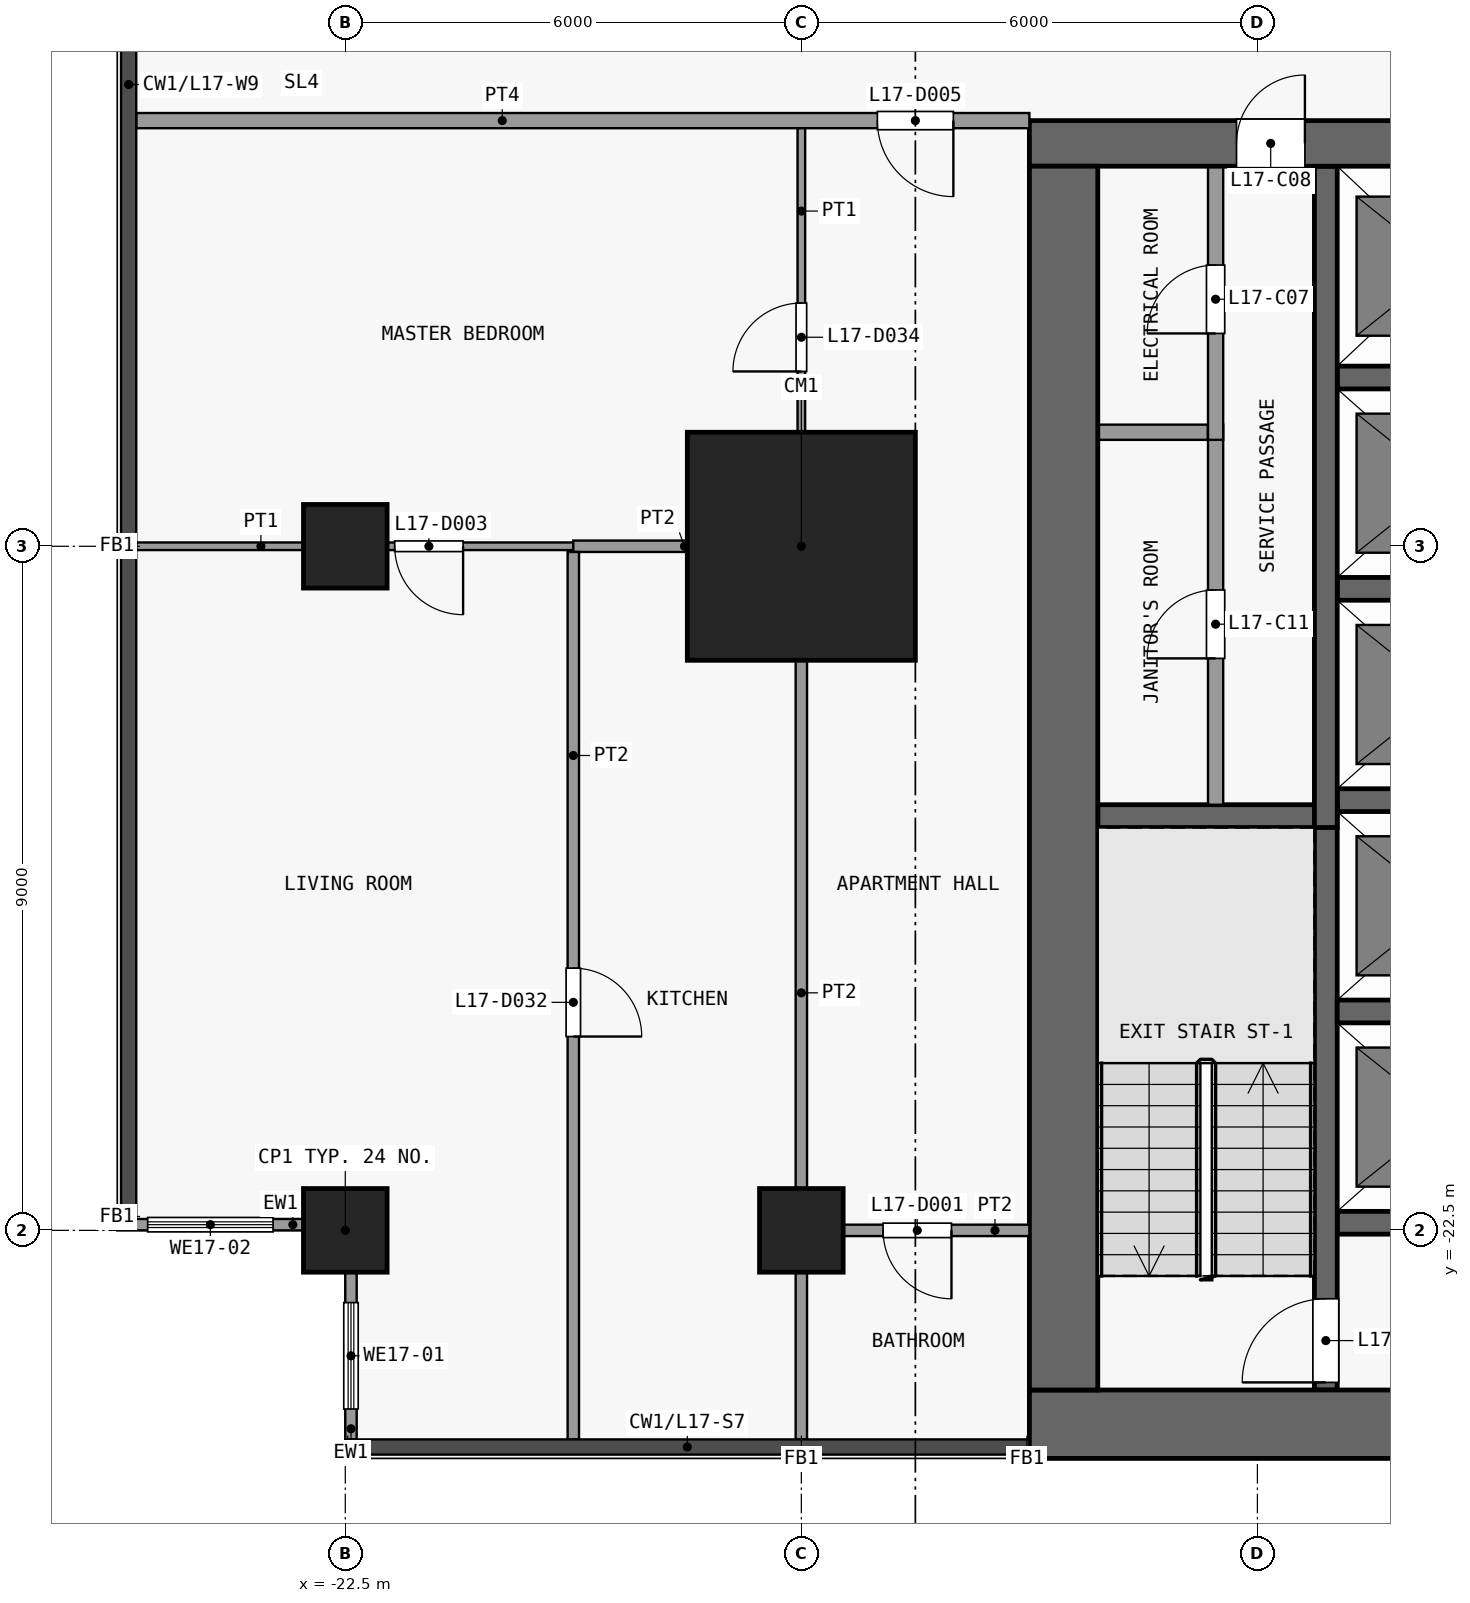
"""IFC4 building model, lengths in metres.
Left out: names, types, materials, properties, quantities, classifications, styles, units other than length and angle.
Written with IfcOpenShell. Run it as: python <this file> out.ifc"""

import sys

from ifc_helpers import new_model, si_unit, direction, frame, frame_2d, origin, origin_2d, place, context, subcontext, project, spatial, rectangle, extrude, element, fill, save


model = new_model("IFC4")
c1 = context("Model", 3, precision=1e-05, world=origin(), true_north=direction((0.0, 1.0)))
c2 = subcontext(c1, "Body", "Model", "MODEL_VIEW")
j1 = project(units=[si_unit("LENGTHUNIT", "METRE"), si_unit("PLANEANGLEUNIT", "RADIAN")], contexts=[c1])
p1 = place(None, origin())
s1 = spatial("IfcSite", under=j1, at=p1, CompositionType="ELEMENT")
p2 = place(p1, origin())
s2 = spatial("IfcBuilding", under=s1, at=p2, CompositionType="ELEMENT")
p3 = place(p2, frame((0.0, 0.0, 72.1)))
s3 = spatial("IfcBuildingStorey", under=s2, at=p3, CompositionType="ELEMENT", Elevation=72.1)
for number, where, z_axis, x_axis in (
    (1, (-22.5, -22.5, 0.0), (0.0, 0.0, 1.0), (1.0, 0.0, 0.0)),
    (2, (-22.5, -13.5, 0.0), (0.0, 0.0, 1.0), (1.0, 0.0, 0.0)),
    (3, (-16.5, -22.5, 0.0), (0.0, 0.0, 1.0), (1.0, 0.0, 0.0)),
):
    element("IfcColumn", number, at=place(p3, frame(where, z_axis=z_axis, x_axis=x_axis)), inside=s3, PredefinedType="COLUMN", context=c2, shape_type="SweptSolid", body=[
        extrude(rectangle(XDim=1.1, YDim=1.1, at=origin_2d()), origin(), (0.0, 0.0, 1.0), 3.6),
    ])
p4 = place(p3, frame((-16.5, -13.5, 0.0), z_axis=(0.0, 0.0, 1.0), x_axis=(1.0, 0.0, 0.0)))
e4 = element("IfcColumn", 4, at=p4, inside=s3, PredefinedType="COLUMN", context=c2, shape_type="SweptSolid", body=[
    extrude(rectangle(XDim=3.0, YDim=3.0, at=origin_2d()), origin(), (0.0, 0.0, 1.0), 3.6),
])
p5 = place(p3, frame((-13.5, -25.05, 0.0), z_axis=(0.0, 0.0, 1.0), x_axis=(1.0, 0.0, 0.0)))
e5 = element("IfcWall", 5, at=p5, inside=s3, PredefinedType="SHEAR", context=c2, shape_type="SweptSolid", body=[
    extrude(rectangle(XDim=27.0, YDim=0.9, at=frame_2d((13.5, 0.0))), origin(), (0.0, 0.0, 1.0), 3.15),
])
p6 = place(p3, frame((-13.5, -8.2, 0.0), z_axis=(0.0, 0.0, 1.0), x_axis=(1.0, 0.0, 0.0)))
e6 = element("IfcWall", 6, at=p6, inside=s3, PredefinedType="SHEAR", context=c2, shape_type="SweptSolid", body=[
    extrude(rectangle(XDim=27.0, YDim=0.6, at=frame_2d((13.5, 0.0))), origin(), (0.0, 0.0, 1.0), 3.15),
])
p7 = place(p6, frame((7.8, 0.0, 0.0)))
e7 = element("IfcOpeningElement", 7, at=p7, cuts=e6, PredefinedType="OPENING", context=c2, shape_type="SweptSolid", body=[
    extrude(rectangle(XDim=1.8, YDim=2.1, at=frame_2d((0.9, 1.05))), frame((0.0, 0.31, 0.0), z_axis=(0.0, -1.0, 0.0), x_axis=(1.0, 0.0, 0.0)), (0.0, 0.0, 1.0), 0.62),
])
p8 = place(p6, frame((17.4, 0.0, 0.0)))
e8 = element("IfcOpeningElement", 8, at=p8, cuts=e6, PredefinedType="OPENING", context=c2, shape_type="SweptSolid", body=[
    extrude(rectangle(XDim=1.8, YDim=2.1, at=frame_2d((0.9, 1.05))), frame((0.0, 0.31, 0.0), z_axis=(0.0, -1.0, 0.0), x_axis=(1.0, 0.0, 0.0)), (0.0, 0.0, 1.0), 0.62),
])
p9 = place(p6, frame((2.725, 0.0, 0.0)))
e9 = element("IfcOpeningElement", 9, at=p9, cuts=e6, PredefinedType="OPENING", context=c2, shape_type="SweptSolid", body=[
    extrude(rectangle(XDim=0.9, YDim=2.1, at=frame_2d((0.45, 1.05))), frame((0.0, 0.31, 0.0), z_axis=(0.0, -1.0, 0.0), x_axis=(1.0, 0.0, 0.0)), (0.0, 0.0, 1.0), 0.62),
])
p10 = place(p6, frame((24.075, 0.0, 0.0)))
e10 = element("IfcOpeningElement", 10, at=p10, cuts=e6, PredefinedType="OPENING", context=c2, shape_type="SweptSolid", body=[
    extrude(rectangle(XDim=1.2, YDim=2.1, at=frame_2d((0.6, 1.05))), frame((0.0, 0.31, 0.0), z_axis=(0.0, -1.0, 0.0), x_axis=(1.0, 0.0, 0.0)), (0.0, 0.0, 1.0), 0.62),
])
p11 = place(p3, frame((-13.05, -24.6, 0.0), z_axis=(0.0, 0.0, 1.0), x_axis=(0.0, 1.0, 0.0)))
e11 = element("IfcWall", 11, at=p11, inside=s3, PredefinedType="SHEAR", context=c2, shape_type="SweptSolid", body=[
    extrude(rectangle(XDim=16.1, YDim=0.9, at=frame_2d((8.05, 0.0))), origin(), (0.0, 0.0, 1.0), 3.15),
])
for number, where, z_axis, x_axis in (
    (12, (-9.45, -22.4, 0.0), (0.0, 0.0, 1.0), (1.0, 0.0, 0.0)),
    (13, (-9.45, -19.62, 0.0), (0.0, 0.0, 1.0), (1.0, 0.0, 0.0)),
):
    element("IfcWall", number, at=place(p3, frame(where, z_axis=z_axis, x_axis=x_axis)), inside=s3, PredefinedType="SHEAR", context=c2, shape_type="SweptSolid", body=[
        extrude(rectangle(XDim=2.8, YDim=0.3, at=frame_2d((1.4, 0.0))), origin(), (0.0, 0.0, 1.0), 3.15),
    ])
p12 = place(p3, frame((-12.6, -17.05, 0.0), z_axis=(0.0, 0.0, 1.0), x_axis=(1.0, 0.0, 0.0)))
e14 = element("IfcWall", 14, at=p12, inside=s3, PredefinedType="SHEAR", context=c2, shape_type="SweptSolid", body=[
    extrude(rectangle(XDim=2.85, YDim=0.3, at=frame_2d((1.425, 0.0))), origin(), (0.0, 0.0, 1.0), 3.15),
])
for number, where, z_axis, x_axis in (
    (15, (-9.45, -16.84, 0.0), (0.0, 0.0, 1.0), (1.0, 0.0, 0.0)),
    (16, (-9.45, -14.06, 0.0), (0.0, 0.0, 1.0), (1.0, 0.0, 0.0)),
):
    element("IfcWall", number, at=place(p3, frame(where, z_axis=z_axis, x_axis=x_axis)), inside=s3, PredefinedType="SHEAR", context=c2, shape_type="SweptSolid", body=[
        extrude(rectangle(XDim=2.8, YDim=0.3, at=frame_2d((1.4, 0.0))), origin(), (0.0, 0.0, 1.0), 3.15),
    ])
p13 = place(p3, frame((-12.6, -12.0, 0.0), z_axis=(0.0, 0.0, 1.0), x_axis=(1.0, 0.0, 0.0)))
e17 = element("IfcWall", 17, at=p13, inside=s3, PredefinedType="PARTITIONING", context=c2, shape_type="SweptSolid", body=[
    extrude(rectangle(XDim=1.45, YDim=0.2, at=frame_2d((0.725, 0.0))), origin(), (0.0, 0.0, 1.0), 3.15),
])
p14 = place(p3, frame((-9.45, -11.28, 0.0), z_axis=(0.0, 0.0, 1.0), x_axis=(1.0, 0.0, 0.0)))
e18 = element("IfcWall", 18, at=p14, inside=s3, PredefinedType="SHEAR", context=c2, shape_type="SweptSolid", body=[
    extrude(rectangle(XDim=2.8, YDim=0.3, at=frame_2d((1.4, 0.0))), origin(), (0.0, 0.0, 1.0), 3.15),
])
p15 = place(p3, frame((-11.05, -16.9, 0.0), z_axis=(0.0, 0.0, 1.0), x_axis=(0.0, 1.0, 0.0)))
e19 = element("IfcWall", 19, at=p15, inside=s3, PredefinedType="PARTITIONING", context=c2, shape_type="SweptSolid", body=[
    extrude(rectangle(XDim=5.0, YDim=0.2, at=frame_2d((2.5, 0.0))), origin(), (0.0, 0.0, 1.0), 3.15),
])
p16 = place(p15, frame((1.925, 0.0, 0.0)))
e20 = element("IfcOpeningElement", 20, at=p16, cuts=e19, PredefinedType="OPENING", context=c2, shape_type="SweptSolid", body=[
    extrude(rectangle(XDim=0.9, YDim=2.1, at=frame_2d((0.45, 1.05))), frame((0.0, 0.11, 0.0), z_axis=(0.0, -1.0, 0.0), x_axis=(1.0, 0.0, 0.0)), (0.0, 0.0, 1.0), 0.22),
])
p17 = place(p3, frame((-11.05, -12.1, 0.0), z_axis=(0.0, 0.0, 1.0), x_axis=(0.0, 1.0, 0.0)))
e21 = element("IfcWall", 21, at=p17, inside=s3, PredefinedType="PARTITIONING", context=c2, shape_type="SweptSolid", body=[
    extrude(rectangle(XDim=3.6, YDim=0.2, at=frame_2d((1.8, 0.0))), origin(), (0.0, 0.0, 1.0), 3.15),
])
p18 = place(p17, frame((1.4, 0.0, 0.0)))
e22 = element("IfcOpeningElement", 22, at=p18, cuts=e21, PredefinedType="OPENING", context=c2, shape_type="SweptSolid", body=[
    extrude(rectangle(XDim=0.9, YDim=2.1, at=frame_2d((0.45, 1.05))), frame((0.0, 0.11, 0.0), z_axis=(0.0, -1.0, 0.0), x_axis=(1.0, 0.0, 0.0)), (0.0, 0.0, 1.0), 0.22),
])
p19 = place(p3, frame((-9.6, -24.6, 0.0), z_axis=(0.0, 0.0, 1.0), x_axis=(0.0, 1.0, 0.0)))
e23 = element("IfcWall", 23, at=p19, inside=s3, PredefinedType="SHEAR", context=c2, shape_type="SweptSolid", body=[
    extrude(rectangle(XDim=7.7, YDim=0.3, at=frame_2d((3.85, 0.0))), origin(), (0.0, 0.0, 1.0), 3.15),
])
p20 = place(p19, frame((0.1, 0.0, 0.0)))
e24 = element("IfcOpeningElement", 24, at=p20, cuts=e23, PredefinedType="OPENING", context=c2, shape_type="SweptSolid", body=[
    extrude(rectangle(XDim=1.1, YDim=2.1, at=frame_2d((0.55, 1.05))), frame((0.0, 0.16, 0.0), z_axis=(0.0, -1.0, 0.0), x_axis=(1.0, 0.0, 0.0)), (0.0, 0.0, 1.0), 0.32),
])
p21 = place(p3, frame((-9.6, -17.2, 0.0), z_axis=(0.0, 0.0, 1.0), x_axis=(0.0, 1.0, 0.0)))
e25 = element("IfcWall", 25, at=p21, inside=s3, PredefinedType="SHEAR", context=c2, shape_type="SweptSolid", body=[
    extrude(rectangle(XDim=8.7, YDim=0.3, at=frame_2d((4.35, 0.0))), origin(), (0.0, 0.0, 1.0), 3.15),
])
p22 = place(p3, frame((-22.425, -25.25, 0.0), z_axis=(0.0, 0.0, 1.0), x_axis=(0.0, 1.0, 0.0)))
e26 = element("IfcWall", 26, at=p22, inside=s3, PredefinedType="SOLIDWALL", context=c2, shape_type="SweptSolid", body=[
    extrude(rectangle(XDim=2.2, YDim=0.15, at=frame_2d((1.1, 0.0))), origin(), (0.0, 0.0, 1.0), 3.15),
])
p23 = place(p22, frame((0.4, 0.0, 0.9)))
e27 = element("IfcOpeningElement", 27, at=p23, cuts=e26, PredefinedType="OPENING", context=c2, shape_type="SweptSolid", body=[
    extrude(rectangle(XDim=1.4, YDim=2.4, at=frame_2d((0.7, 1.2))), frame((0.0, 0.085, 0.0), z_axis=(0.0, -1.0, 0.0), x_axis=(1.0, 0.0, 0.0)), (0.0, 0.0, 1.0), 0.17),
])
p24 = place(p3, frame((-23.05, -22.425, 0.0), z_axis=(0.0, 0.0, 1.0), x_axis=(-1.0, 0.0, 0.0)))
e28 = element("IfcWall", 28, at=p24, inside=s3, PredefinedType="SOLIDWALL", context=c2, shape_type="SweptSolid", body=[
    extrude(rectangle(XDim=2.45, YDim=0.15, at=frame_2d((1.225, 0.0))), origin(), (0.0, 0.0, 1.0), 3.15),
])
p25 = place(p24, frame((0.4, 0.0, 0.9)))
e29 = element("IfcOpeningElement", 29, at=p25, cuts=e28, PredefinedType="OPENING", context=c2, shape_type="SweptSolid", body=[
    extrude(rectangle(XDim=1.65, YDim=2.4, at=frame_2d((0.825, 1.2))), frame((0.0, 0.085, 0.0), z_axis=(0.0, -1.0, 0.0), x_axis=(1.0, 0.0, 0.0)), (0.0, 0.0, 1.0), 0.17),
])
p26 = place(p3, frame((-16.425, -22.5, 0.0), z_axis=(0.0, 0.0, 1.0), x_axis=(1.0, 0.0, 0.0)))
e30 = element("IfcWall", 30, at=p26, inside=s3, PredefinedType="PARTITIONING", context=c2, shape_type="SweptSolid", body=[
    extrude(rectangle(XDim=2.925, YDim=0.15, at=frame_2d((1.462, 0.0))), origin(), (0.0, 0.0, 1.0), 3.15),
])
p27 = place(p26, frame((1.0, 0.0, 0.0)))
e31 = element("IfcOpeningElement", 31, at=p27, cuts=e30, PredefinedType="OPENING", context=c2, shape_type="SweptSolid", body=[
    extrude(rectangle(XDim=0.9, YDim=2.1, at=frame_2d((0.45, 1.05))), frame((0.0, 0.085, 0.0), z_axis=(0.0, -1.0, 0.0), x_axis=(1.0, 0.0, 0.0)), (0.0, 0.0, 1.0), 0.17),
])
p28 = place(p3, frame((-25.25, -13.5, 0.0), z_axis=(0.0, 0.0, 1.0), x_axis=(1.0, 0.0, 0.0)))
e32 = element("IfcWall", 32, at=p28, inside=s3, PredefinedType="PARTITIONING", context=c2, shape_type="SweptSolid", body=[
    extrude(rectangle(XDim=5.75, YDim=0.1, at=frame_2d((2.875, 0.0))), origin(), (0.0, 0.0, 1.0), 3.15),
])
p29 = place(p28, frame((3.4, 0.0, 0.0)))
e33 = element("IfcOpeningElement", 33, at=p29, cuts=e32, PredefinedType="OPENING", context=c2, shape_type="SweptSolid", body=[
    extrude(rectangle(XDim=0.9, YDim=2.1, at=frame_2d((0.45, 1.05))), frame((0.0, 0.06, 0.0), z_axis=(0.0, -1.0, 0.0), x_axis=(1.0, 0.0, 0.0)), (0.0, 0.0, 1.0), 0.12),
])
p30 = place(p3, frame((-19.5, -13.5, 0.0), z_axis=(0.0, 0.0, 1.0), x_axis=(1.0, 0.0, 0.0)))
e34 = element("IfcWall", 34, at=p30, inside=s3, PredefinedType="PARTITIONING", context=c2, shape_type="SweptSolid", body=[
    extrude(rectangle(XDim=2.925, YDim=0.15, at=frame_2d((1.462, 0.0))), origin(), (0.0, 0.0, 1.0), 3.15),
])
p31 = place(p3, frame((-25.25, -7.9, 0.0), z_axis=(0.0, 0.0, 1.0), x_axis=(1.0, 0.0, 0.0)))
e35 = element("IfcWall", 35, at=p31, inside=s3, PredefinedType="PARTITIONING", context=c2, shape_type="SweptSolid", body=[
    extrude(rectangle(XDim=11.75, YDim=0.2, at=frame_2d((5.875, 0.0))), origin(), (0.0, 0.0, 1.0), 3.15),
])
p32 = place(p31, frame((9.75, 0.0, 0.0)))
e36 = element("IfcOpeningElement", 36, at=p32, cuts=e35, PredefinedType="OPENING", context=c2, shape_type="SweptSolid", body=[
    extrude(rectangle(XDim=1.0, YDim=2.1, at=frame_2d((0.5, 1.05))), frame((0.0, 0.11, 0.0), z_axis=(0.0, -1.0, 0.0), x_axis=(1.0, 0.0, 0.0)), (0.0, 0.0, 1.0), 0.22),
])
p33 = place(p3, frame((-19.5, -25.25, 0.0), z_axis=(0.0, 0.0, 1.0), x_axis=(0.0, 1.0, 0.0)))
e37 = element("IfcWall", 37, at=p33, inside=s3, PredefinedType="PARTITIONING", context=c2, shape_type="SweptSolid", body=[
    extrude(rectangle(XDim=11.675, YDim=0.15, at=frame_2d((5.837, 0.0))), origin(), (0.0, 0.0, 1.0), 3.15),
])
p34 = place(p33, frame((5.3, 0.0, 0.0)))
e38 = element("IfcOpeningElement", 38, at=p34, cuts=e37, PredefinedType="OPENING", context=c2, shape_type="SweptSolid", body=[
    extrude(rectangle(XDim=0.9, YDim=2.1, at=frame_2d((0.45, 1.05))), frame((0.0, 0.085, 0.0), z_axis=(0.0, -1.0, 0.0), x_axis=(1.0, 0.0, 0.0)), (0.0, 0.0, 1.0), 0.17),
])
p35 = place(p3, frame((-16.5, -13.5, 0.0), z_axis=(0.0, 0.0, 1.0), x_axis=(0.0, 1.0, 0.0)))
e39 = element("IfcWall", 39, at=p35, inside=s3, PredefinedType="PARTITIONING", context=c2, shape_type="SweptSolid", body=[
    extrude(rectangle(XDim=5.5, YDim=0.1, at=frame_2d((2.75, 0.0))), origin(), (0.0, 0.0, 1.0), 3.15),
])
p36 = place(p35, frame((2.3, 0.0, 0.0)))
e40 = element("IfcOpeningElement", 40, at=p36, cuts=e39, PredefinedType="OPENING", context=c2, shape_type="SweptSolid", body=[
    extrude(rectangle(XDim=0.9, YDim=2.1, at=frame_2d((0.45, 1.05))), frame((0.0, 0.06, 0.0), z_axis=(0.0, -1.0, 0.0), x_axis=(1.0, 0.0, 0.0)), (0.0, 0.0, 1.0), 0.12),
])
p37 = place(p3, frame((-16.5, -25.25, 0.0), z_axis=(0.0, 0.0, 1.0), x_axis=(0.0, 1.0, 0.0)))
e41 = element("IfcWall", 41, at=p37, inside=s3, PredefinedType="PARTITIONING", context=c2, shape_type="SweptSolid", body=[
    extrude(rectangle(XDim=11.75, YDim=0.15, at=frame_2d((5.875, 0.0))), origin(), (0.0, 0.0, 1.0), 3.15),
])
p38 = place(p18, origin())
e42 = element("IfcDoor", 42, at=p38, inside=s3, OperationType="SINGLE_SWING_LEFT", PredefinedType="DOOR", context=c2, shape_type="SweptSolid", body=[
    extrude(rectangle(XDim=0.9, YDim=2.1, at=frame_2d((0.45, 1.05))), frame((0.0, 0.025, 0.0), z_axis=(0.0, -1.0, 0.0), x_axis=(1.0, 0.0, 0.0)), (0.0, 0.0, 1.0), 0.05),
])
fill(e22, e42)
p39 = place(p9, origin())
e43 = element("IfcDoor", 43, at=p39, inside=s3, OperationType="SINGLE_SWING_RIGHT", PredefinedType="DOOR", context=c2, shape_type="SweptSolid", body=[
    extrude(rectangle(XDim=0.9, YDim=2.1, at=frame_2d((0.45, 1.05))), frame((0.0, 0.025, 0.0), z_axis=(0.0, -1.0, 0.0), x_axis=(1.0, 0.0, 0.0)), (0.0, 0.0, 1.0), 0.05),
])
fill(e9, e43)
p40 = place(p16, origin())
e44 = element("IfcDoor", 44, at=p40, inside=s3, OperationType="SINGLE_SWING_LEFT", PredefinedType="DOOR", context=c2, shape_type="SweptSolid", body=[
    extrude(rectangle(XDim=0.9, YDim=2.1, at=frame_2d((0.45, 1.05))), frame((0.0, 0.025, 0.0), z_axis=(0.0, -1.0, 0.0), x_axis=(1.0, 0.0, 0.0)), (0.0, 0.0, 1.0), 0.05),
])
fill(e20, e44)
p41 = place(p20, origin())
e45 = element("IfcDoor", 45, at=p41, inside=s3, OperationType="SINGLE_SWING_LEFT", PredefinedType="DOOR", context=c2, shape_type="SweptSolid", body=[
    extrude(rectangle(XDim=1.1, YDim=2.1, at=frame_2d((0.55, 1.05))), frame((0.0, 0.025, 0.0), z_axis=(0.0, -1.0, 0.0), x_axis=(1.0, 0.0, 0.0)), (0.0, 0.0, 1.0), 0.05),
])
fill(e24, e45)
p42 = place(p23, origin())
e46 = element("IfcWindow", 46, at=p42, inside=s3, PartitioningType="SINGLE_PANEL", PredefinedType="WINDOW", context=c2, shape_type="SweptSolid", body=[
    extrude(rectangle(XDim=1.4, YDim=2.4, at=frame_2d((0.7, 1.2))), frame((0.0, 0.03, 0.0), z_axis=(0.0, -1.0, 0.0), x_axis=(1.0, 0.0, 0.0)), (0.0, 0.0, 1.0), 0.06),
])
fill(e27, e46)
p43 = place(p25, origin())
e47 = element("IfcWindow", 47, at=p43, inside=s3, PartitioningType="SINGLE_PANEL", PredefinedType="WINDOW", context=c2, shape_type="SweptSolid", body=[
    extrude(rectangle(XDim=1.65, YDim=2.4, at=frame_2d((0.825, 1.2))), frame((0.0, 0.03, 0.0), z_axis=(0.0, -1.0, 0.0), x_axis=(1.0, 0.0, 0.0)), (0.0, 0.0, 1.0), 0.06),
])
fill(e29, e47)
p44 = place(p27, origin())
e48 = element("IfcDoor", 48, at=p44, inside=s3, OperationType="SINGLE_SWING_RIGHT", PredefinedType="DOOR", context=c2, shape_type="SweptSolid", body=[
    extrude(rectangle(XDim=0.9, YDim=2.1, at=frame_2d((0.45, 1.05))), frame((0.0, 0.025, 0.0), z_axis=(0.0, -1.0, 0.0), x_axis=(1.0, 0.0, 0.0)), (0.0, 0.0, 1.0), 0.05),
])
fill(e31, e48)
p45 = place(p29, origin())
e49 = element("IfcDoor", 49, at=p45, inside=s3, OperationType="SINGLE_SWING_RIGHT", PredefinedType="DOOR", context=c2, shape_type="SweptSolid", body=[
    extrude(rectangle(XDim=0.9, YDim=2.1, at=frame_2d((0.45, 1.05))), frame((0.0, 0.025, 0.0), z_axis=(0.0, -1.0, 0.0), x_axis=(1.0, 0.0, 0.0)), (0.0, 0.0, 1.0), 0.05),
])
fill(e33, e49)
p46 = place(p32, origin())
e50 = element("IfcDoor", 50, at=p46, inside=s3, OperationType="SINGLE_SWING_RIGHT", PredefinedType="DOOR", context=c2, shape_type="SweptSolid", body=[
    extrude(rectangle(XDim=1.0, YDim=2.1, at=frame_2d((0.5, 1.05))), frame((0.0, 0.025, 0.0), z_axis=(0.0, -1.0, 0.0), x_axis=(1.0, 0.0, 0.0)), (0.0, 0.0, 1.0), 0.05),
])
fill(e36, e50)
p47 = place(p34, origin())
e51 = element("IfcDoor", 51, at=p47, inside=s3, OperationType="SINGLE_SWING_LEFT", PredefinedType="DOOR", context=c2, shape_type="SweptSolid", body=[
    extrude(rectangle(XDim=0.9, YDim=2.1, at=frame_2d((0.45, 1.05))), frame((0.0, 0.025, 0.0), z_axis=(0.0, -1.0, 0.0), x_axis=(1.0, 0.0, 0.0)), (0.0, 0.0, 1.0), 0.05),
])
fill(e38, e51)
p48 = place(p36, origin())
e52 = element("IfcDoor", 52, at=p48, inside=s3, OperationType="SINGLE_SWING_RIGHT", PredefinedType="DOOR", context=c2, shape_type="SweptSolid", body=[
    extrude(rectangle(XDim=0.9, YDim=2.1, at=frame_2d((0.45, 1.05))), frame((0.0, 0.025, 0.0), z_axis=(0.0, -1.0, 0.0), x_axis=(1.0, 0.0, 0.0)), (0.0, 0.0, 1.0), 0.05),
])
fill(e40, e52)
save(model, sys.argv[1])
